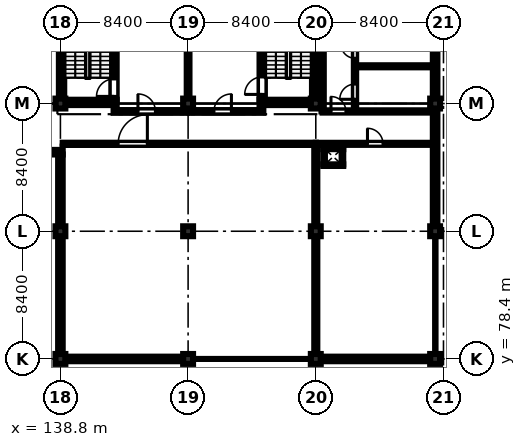
"""IFC4 building model, lengths in metres.
Left out: names, types, materials, properties, quantities, classifications, styles, units other than length and angle.
Written with IfcOpenShell. Run it as: python <this file> out.ifc"""

import sys

from ifc_helpers import new_model, si_unit, direction, frame, frame_2d, origin, origin_2d, place, context, subcontext, project, spatial, rectangle, extrude, element, fill, save


model = new_model("IFC4")
c1 = context("Model", 3, precision=1e-05, world=origin(), true_north=direction((0.0, 1.0)))
c2 = subcontext(c1, "Body", "Model", "MODEL_VIEW")
j1 = project(units=[si_unit("LENGTHUNIT", "METRE"), si_unit("PLANEANGLEUNIT", "RADIAN")], contexts=[c1])
p1 = place(None, origin())
s1 = spatial("IfcSite", under=j1, at=p1, CompositionType="ELEMENT")
p2 = place(p1, origin())
s2 = spatial("IfcBuilding", under=s1, at=p2, CompositionType="ELEMENT")
p3 = place(p2, frame((0.0, 0.0, 61.2)))
s3 = spatial("IfcBuildingStorey", under=s2, at=p3, CompositionType="ELEMENT", Elevation=61.2)
for number, where, z_axis, x_axis in (
    (1, (138.8, 78.4, 0.0), (0.0, 0.0, 1.0), (1.0, 0.0, 0.0)),
    (2, (138.8, 86.8, 0.0), (0.0, 0.0, 1.0), (1.0, 0.0, 0.0)),
    (3, (138.8, 95.2, 0.0), (0.0, 0.0, 1.0), (1.0, 0.0, 0.0)),
    (4, (147.2, 78.4, 0.0), (0.0, 0.0, 1.0), (1.0, 0.0, 0.0)),
    (5, (147.2, 86.8, 0.0), (0.0, 0.0, 1.0), (1.0, 0.0, 0.0)),
    (6, (147.2, 95.2, 0.0), (0.0, 0.0, 1.0), (1.0, 0.0, 0.0)),
    (7, (155.6, 78.4, 0.0), (0.0, 0.0, 1.0), (1.0, 0.0, 0.0)),
    (8, (155.6, 86.8, 0.0), (0.0, 0.0, 1.0), (1.0, 0.0, 0.0)),
    (9, (155.6, 95.2, 0.0), (0.0, 0.0, 1.0), (1.0, 0.0, 0.0)),
    (10, (163.45, 78.4, 0.0), (0.0, 0.0, 1.0), (1.0, 0.0, 0.0)),
    (11, (163.45, 86.8, 0.0), (0.0, 0.0, 1.0), (1.0, 0.0, 0.0)),
    (12, (163.45, 95.2, 0.0), (0.0, 0.0, 1.0), (1.0, 0.0, 0.0)),
):
    element("IfcColumn", number, at=place(p3, frame(where, z_axis=z_axis, x_axis=x_axis)), inside=s3, PredefinedType="COLUMN", context=c2, shape_type="SweptSolid", body=[
        extrude(rectangle(XDim=0.65, YDim=0.65, at=origin_2d()), origin(), (0.0, 0.0, 1.0), 4.28),
    ])
p4 = place(p3, frame((138.7, 95.275, 0.0), z_axis=(0.0, 0.0, 1.0), x_axis=(1.0, 0.0, 0.0)))
e13 = element("IfcWall", 13, at=p4, inside=s3, PredefinedType="SHEAR", context=c2, shape_type="SweptSolid", body=[
    extrude(rectangle(XDim=3.8, YDim=0.35, at=frame_2d((1.9, 0.0))), origin(), (0.0, 0.0, 1.0), 4.28),
])
p5 = place(p3, frame((138.875, 95.45, 0.0), z_axis=(0.0, 0.0, 1.0), x_axis=(0.0, 1.0, 0.0)))
e14 = element("IfcWall", 14, at=p5, inside=s3, PredefinedType="SHEAR", context=c2, shape_type="SweptSolid", body=[
    extrude(rectangle(XDim=7.9, YDim=0.35, at=frame_2d((3.95, 0.0))), origin(), (0.0, 0.0, 1.0), 4.28),
])
p6 = place(p3, frame((142.325, 95.45, 0.0), z_axis=(0.0, 0.0, 1.0), x_axis=(0.0, 1.0, 0.0)))
e15 = element("IfcWall", 15, at=p6, inside=s3, PredefinedType="SHEAR", context=c2, shape_type="SweptSolid", body=[
    extrude(rectangle(XDim=7.9, YDim=0.35, at=frame_2d((3.95, 0.0))), origin(), (0.0, 0.0, 1.0), 4.28),
])
p7 = place(p6, frame((0.22, 0.0, 0.0)))
e16 = element("IfcOpeningElement", 16, at=p7, cuts=e15, PredefinedType="OPENING", context=c2, shape_type="SweptSolid", body=[
    extrude(rectangle(XDim=1.15, YDim=2.15, at=frame_2d((0.575, 1.075))), frame((0.0, 0.185, 0.0), z_axis=(0.0, -1.0, 0.0), x_axis=(1.0, 0.0, 0.0)), (0.0, 0.0, 1.0), 0.37),
])
p8 = place(p3, frame((151.9, 95.275, 0.0), z_axis=(0.0, 0.0, 1.0), x_axis=(1.0, 0.0, 0.0)))
e17 = element("IfcWall", 17, at=p8, inside=s3, PredefinedType="SHEAR", context=c2, shape_type="SweptSolid", body=[
    extrude(rectangle(XDim=3.8, YDim=0.35, at=frame_2d((1.9, 0.0))), origin(), (0.0, 0.0, 1.0), 4.28),
])
p9 = place(p3, frame((152.075, 95.45, 0.0), z_axis=(0.0, 0.0, 1.0), x_axis=(0.0, 1.0, 0.0)))
e18 = element("IfcWall", 18, at=p9, inside=s3, PredefinedType="SHEAR", context=c2, shape_type="SweptSolid", body=[
    extrude(rectangle(XDim=7.9, YDim=0.35, at=frame_2d((3.95, 0.0))), origin(), (0.0, 0.0, 1.0), 4.28),
])
p10 = place(p9, frame((0.35, 0.0, 0.0)))
e19 = element("IfcOpeningElement", 19, at=p10, cuts=e18, PredefinedType="OPENING", context=c2, shape_type="SweptSolid", body=[
    extrude(rectangle(XDim=1.15, YDim=2.15, at=frame_2d((0.575, 1.075))), frame((0.0, 0.185, 0.0), z_axis=(0.0, -1.0, 0.0), x_axis=(1.0, 0.0, 0.0)), (0.0, 0.0, 1.0), 0.37),
])
p11 = place(p3, frame((155.525, 95.45, 0.0), z_axis=(0.0, 0.0, 1.0), x_axis=(0.0, 1.0, 0.0)))
e20 = element("IfcWall", 20, at=p11, inside=s3, PredefinedType="SHEAR", context=c2, shape_type="SweptSolid", body=[
    extrude(rectangle(XDim=7.9, YDim=0.35, at=frame_2d((3.95, 0.0))), origin(), (0.0, 0.0, 1.0), 4.28),
])
p12 = place(p3, frame((146.875, 78.4, 0.0), z_axis=(0.0, 0.0, 1.0), x_axis=(-1.0, 0.0, 0.0)))
e21 = element("IfcWall", 21, at=p12, inside=s3, PredefinedType="STANDARD", context=c2, shape_type="SweptSolid", body=[
    extrude(rectangle(XDim=7.75, YDim=0.3, at=frame_2d((3.875, 0.0))), origin(), (0.0, 0.0, 1.0), 3.58),
])
p13 = place(p12, frame((1.15, 0.0, 0.95)))
e22 = element("IfcOpeningElement", 22, at=p13, cuts=e21, PredefinedType="OPENING", context=c2, shape_type="SweptSolid", body=[
    extrude(rectangle(XDim=2.4, YDim=2.1, at=frame_2d((1.2, 1.05))), frame((0.0, 0.16, 0.0), z_axis=(0.0, -1.0, 0.0), x_axis=(1.0, 0.0, 0.0)), (0.0, 0.0, 1.0), 0.32),
])
p14 = place(p3, frame((163.125, 78.4, 0.0), z_axis=(0.0, 0.0, 1.0), x_axis=(-1.0, 0.0, 0.0)))
e23 = element("IfcWall", 23, at=p14, inside=s3, PredefinedType="STANDARD", context=c2, shape_type="SweptSolid", body=[
    extrude(rectangle(XDim=7.2, YDim=0.3, at=frame_2d((3.6, 0.0))), origin(), (0.0, 0.0, 1.0), 3.58),
])
p15 = place(p14, frame((1.15, 0.0, 0.95)))
e24 = element("IfcOpeningElement", 24, at=p15, cuts=e23, PredefinedType="OPENING", context=c2, shape_type="SweptSolid", body=[
    extrude(rectangle(XDim=2.4, YDim=2.1, at=frame_2d((1.2, 1.05))), frame((0.0, 0.16, 0.0), z_axis=(0.0, -1.0, 0.0), x_axis=(1.0, 0.0, 0.0)), (0.0, 0.0, 1.0), 0.32),
])
p16 = place(p3, frame((163.45, 94.875, 0.0), z_axis=(0.0, 0.0, 1.0), x_axis=(0.0, -1.0, 0.0)))
e25 = element("IfcWall", 25, at=p16, inside=s3, PredefinedType="STANDARD", context=c2, shape_type="SweptSolid", body=[
    extrude(rectangle(XDim=7.75, YDim=0.3, at=frame_2d((3.875, 0.0))), origin(), (0.0, 0.0, 1.0), 3.58),
])
p17 = place(p16, frame((4.2, 0.0, 1.1)))
e26 = element("IfcOpeningElement", 26, at=p17, cuts=e25, PredefinedType="OPENING", context=c2, shape_type="SweptSolid", body=[
    extrude(rectangle(XDim=1.8, YDim=1.8, at=frame_2d((0.9, 0.9))), frame((0.0, 0.16, 0.0), z_axis=(0.0, -1.0, 0.0), x_axis=(1.0, 0.0, 0.0)), (0.0, 0.0, 1.0), 0.32),
])
p18 = place(p3, frame((163.45, 103.275, 0.0), z_axis=(0.0, 0.0, 1.0), x_axis=(0.0, -1.0, 0.0)))
e27 = element("IfcWall", 27, at=p18, inside=s3, PredefinedType="STANDARD", context=c2, shape_type="SweptSolid", body=[
    extrude(rectangle(XDim=7.75, YDim=0.3, at=frame_2d((3.875, 0.0))), origin(), (0.0, 0.0, 1.0), 3.58),
])
p19 = place(p18, frame((1.15, 0.0, 1.1)))
e28 = element("IfcOpeningElement", 28, at=p19, cuts=e27, PredefinedType="OPENING", context=c2, shape_type="SweptSolid", body=[
    extrude(rectangle(XDim=1.4, YDim=1.4, at=frame_2d((0.7, 0.7))), frame((0.0, 0.16, 0.0), z_axis=(0.0, -1.0, 0.0), x_axis=(1.0, 0.0, 0.0)), (0.0, 0.0, 1.0), 0.32),
])
p20 = place(p3, frame((138.8, 78.725, 0.0), z_axis=(0.0, 0.0, 1.0), x_axis=(0.0, 1.0, 0.0)))
e29 = element("IfcWall", 29, at=p20, inside=s3, PredefinedType="STANDARD", context=c2, shape_type="SweptSolid", body=[
    extrude(rectangle(XDim=7.75, YDim=0.3, at=frame_2d((3.875, 0.0))), origin(), (0.0, 0.0, 1.0), 3.58),
])
p21 = place(p20, frame((2.4, 0.0, 0.95)))
e30 = element("IfcOpeningElement", 30, at=p21, cuts=e29, PredefinedType="OPENING", context=c2, shape_type="SweptSolid", body=[
    extrude(rectangle(XDim=1.5, YDim=1.8, at=frame_2d((0.75, 0.9))), frame((0.0, 0.16, 0.0), z_axis=(0.0, -1.0, 0.0), x_axis=(1.0, 0.0, 0.0)), (0.0, 0.0, 1.0), 0.32),
])
p22 = place(p3, frame((138.8, 87.125, 0.0), z_axis=(0.0, 0.0, 1.0), x_axis=(0.0, 1.0, 0.0)))
e31 = element("IfcWall", 31, at=p22, inside=s3, PredefinedType="STANDARD", context=c2, shape_type="SweptSolid", body=[
    extrude(rectangle(XDim=4.725, YDim=0.3, at=frame_2d((2.363, 0.0))), origin(), (0.0, 0.0, 1.0), 3.58),
])
p23 = place(p22, frame((2.4, 0.0, 0.95)))
e32 = element("IfcOpeningElement", 32, at=p23, cuts=e31, PredefinedType="OPENING", context=c2, shape_type="SweptSolid", body=[
    extrude(rectangle(XDim=1.5, YDim=1.8, at=frame_2d((0.75, 0.9))), frame((0.0, 0.16, 0.0), z_axis=(0.0, -1.0, 0.0), x_axis=(1.0, 0.0, 0.0)), (0.0, 0.0, 1.0), 0.32),
])
p24 = place(p3, frame((138.95, 92.0, 0.0), z_axis=(0.0, 0.0, 1.0), x_axis=(-1.0, 0.0, 0.0)))
e33 = element("IfcWall", 33, at=p24, inside=s3, PredefinedType="STANDARD", context=c2, shape_type="SweptSolid", body=[
    extrude(rectangle(XDim=8.7, YDim=0.3, at=frame_2d((4.35, 0.0))), origin(), (0.0, 0.0, 1.0), 4.28),
])
p25 = place(p3, frame((142.3, 94.68, 0.0), z_axis=(0.0, 0.0, 1.0), x_axis=(1.0, 0.0, 0.0)))
e34 = element("IfcWall", 34, at=p25, inside=s3, PredefinedType="STANDARD", context=c2, shape_type="SweptSolid", body=[
    extrude(rectangle(XDim=4.8, YDim=0.18, at=frame_2d((2.4, 0.0))), origin(), (0.0, 0.0, 1.0), 4.28),
])
p26 = place(p25, frame((1.6, 0.0, 0.0)))
e35 = element("IfcOpeningElement", 35, at=p26, cuts=e34, PredefinedType="OPENING", context=c2, shape_type="SweptSolid", body=[
    extrude(rectangle(XDim=1.15, YDim=2.15, at=frame_2d((0.575, 1.075))), frame((0.0, 0.1, 0.0), z_axis=(0.0, -1.0, 0.0), x_axis=(1.0, 0.0, 0.0)), (0.0, 0.0, 1.0), 0.2),
])
p27 = place(p3, frame((147.3, 94.68, 0.0), z_axis=(0.0, 0.0, 1.0), x_axis=(1.0, 0.0, 0.0)))
e36 = element("IfcWall", 36, at=p27, inside=s3, PredefinedType="STANDARD", context=c2, shape_type="SweptSolid", body=[
    extrude(rectangle(XDim=4.85, YDim=0.18, at=frame_2d((2.425, 0.0))), origin(), (0.0, 0.0, 1.0), 4.28),
])
p28 = place(p27, frame((1.6, 0.0, 0.0)))
e37 = element("IfcOpeningElement", 37, at=p28, cuts=e36, PredefinedType="OPENING", context=c2, shape_type="SweptSolid", body=[
    extrude(rectangle(XDim=1.15, YDim=2.15, at=frame_2d((0.575, 1.075))), frame((0.0, 0.1, 0.0), z_axis=(0.0, -1.0, 0.0), x_axis=(1.0, 0.0, 0.0)), (0.0, 0.0, 1.0), 0.2),
])
p29 = place(p3, frame((147.2, 95.75, 0.0), z_axis=(0.0, 0.0, 1.0), x_axis=(0.0, 1.0, 0.0)))
e38 = element("IfcWall", 38, at=p29, inside=s3, PredefinedType="STANDARD", context=c2, shape_type="SweptSolid", body=[
    extrude(rectangle(XDim=4.5, YDim=0.18, at=frame_2d((2.25, 0.0))), origin(), (0.0, 0.0, 1.0), 3.58),
])
p30 = place(p3, frame((156.05, 94.68, 0.0), z_axis=(0.0, 0.0, 1.0), x_axis=(1.0, 0.0, 0.0)))
e39 = element("IfcWall", 39, at=p30, inside=s3, PredefinedType="PARTITIONING", context=c2, shape_type="SweptSolid", body=[
    extrude(rectangle(XDim=7.15, YDim=0.15, at=frame_2d((3.575, 0.0))), origin(), (0.0, 0.0, 1.0), 4.28),
])
p31 = place(p30, frame((0.55, 0.0, 0.0)))
e40 = element("IfcOpeningElement", 40, at=p31, cuts=e39, PredefinedType="OPENING", context=c2, shape_type="SweptSolid", body=[
    extrude(rectangle(XDim=0.98, YDim=2.12, at=frame_2d((0.49, 1.06))), frame((0.0, 0.085, 0.0), z_axis=(0.0, -1.0, 0.0), x_axis=(1.0, 0.0, 0.0)), (0.0, 0.0, 1.0), 0.17),
])
p32 = place(p3, frame((158.18, 94.68, 0.0), z_axis=(0.0, 0.0, 1.0), x_axis=(0.0, 1.0, 0.0)))
e41 = element("IfcWall", 41, at=p32, inside=s3, PredefinedType="PARTITIONING", context=c2, shape_type="SweptSolid", body=[
    extrude(rectangle(XDim=8.57, YDim=0.15, at=frame_2d((4.285, 0.0))), origin(), (0.0, 0.0, 1.0), 4.28),
])
p33 = place(p32, frame((0.8, 0.0, 0.0)))
e42 = element("IfcOpeningElement", 42, at=p33, cuts=e41, PredefinedType="OPENING", context=c2, shape_type="SweptSolid", body=[
    extrude(rectangle(XDim=1.0, YDim=2.12, at=frame_2d((0.5, 1.06))), frame((0.0, 0.085, 0.0), z_axis=(0.0, -1.0, 0.0), x_axis=(1.0, 0.0, 0.0)), (0.0, 0.0, 1.0), 0.17),
])
p34 = place(p32, frame((3.5, 0.0, 0.0)))
e43 = element("IfcOpeningElement", 43, at=p34, cuts=e41, PredefinedType="OPENING", context=c2, shape_type="SweptSolid", body=[
    extrude(rectangle(XDim=0.92, YDim=2.1, at=frame_2d((0.46, 1.05))), frame((0.0, 0.085, 0.0), z_axis=(0.0, -1.0, 0.0), x_axis=(1.0, 0.0, 0.0)), (0.0, 0.0, 1.0), 0.17),
])
p35 = place(p32, frame((6.4, 0.0, 0.0)))
e44 = element("IfcOpeningElement", 44, at=p35, cuts=e41, PredefinedType="OPENING", context=c2, shape_type="SweptSolid", body=[
    extrude(rectangle(XDim=0.92, YDim=2.1, at=frame_2d((0.46, 1.05))), frame((0.0, 0.085, 0.0), z_axis=(0.0, -1.0, 0.0), x_axis=(1.0, 0.0, 0.0)), (0.0, 0.0, 1.0), 0.17),
])
p36 = place(p3, frame((158.18, 97.65, 0.0), z_axis=(0.0, 0.0, 1.0), x_axis=(1.0, 0.0, 0.0)))
e45 = element("IfcWall", 45, at=p36, inside=s3, PredefinedType="PARTITIONING", context=c2, shape_type="SweptSolid", body=[
    extrude(rectangle(XDim=5.02, YDim=0.135, at=frame_2d((2.51, 0.0))), origin(), (0.0, 0.0, 1.0), 4.28),
])
p37 = place(p3, frame((156.05, 94.68, 0.0), z_axis=(0.0, 0.0, 1.0), x_axis=(0.0, 1.0, 0.0)))
e46 = element("IfcWall", 46, at=p37, inside=s3, PredefinedType="PARTITIONING", context=c2, shape_type="SweptSolid", body=[
    extrude(rectangle(XDim=8.57, YDim=0.15, at=frame_2d((4.285, 0.0))), origin(), (0.0, 0.0, 1.0), 4.28),
])
p38 = place(p3, frame((138.95, 92.55, 0.0), z_axis=(0.0, 0.0, 1.0), x_axis=(1.0, 0.0, 0.0)))
e47 = element("IfcWall", 47, at=p38, inside=s3, PredefinedType="PARTITIONING", context=c2, shape_type="SweptSolid", body=[
    extrude(rectangle(XDim=16.65, YDim=0.145, at=frame_2d((8.325, 0.0))), origin(), (0.0, 0.0, 1.0), 4.28),
])
p39 = place(p38, frame((3.65, 0.0, 0.0)))
e48 = element("IfcOpeningElement", 48, at=p39, cuts=e47, PredefinedType="OPENING", context=c2, shape_type="SweptSolid", body=[
    extrude(rectangle(XDim=1.92, YDim=2.28, at=frame_2d((0.96, 1.14))), frame((0.0, 0.083, 0.0), z_axis=(0.0, -1.0, 0.0), x_axis=(1.0, 0.0, 0.0)), (0.0, 0.0, 1.0), 0.165),
])
p40 = place(p3, frame((155.6, 92.55, 0.0), z_axis=(0.0, 0.0, 1.0), x_axis=(1.0, 0.0, 0.0)))
e49 = element("IfcWall", 49, at=p40, inside=s3, PredefinedType="PARTITIONING", context=c2, shape_type="SweptSolid", body=[
    extrude(rectangle(XDim=7.75, YDim=0.135, at=frame_2d((3.875, 0.0))), origin(), (0.0, 0.0, 1.0), 4.28),
])
p41 = place(p40, frame((3.4, 0.0, 0.0)))
e50 = element("IfcOpeningElement", 50, at=p41, cuts=e49, PredefinedType="OPENING", context=c2, shape_type="SweptSolid", body=[
    extrude(rectangle(XDim=1.02, YDim=2.15, at=frame_2d((0.51, 1.075))), frame((0.0, 0.077, 0.0), z_axis=(0.0, -1.0, 0.0), x_axis=(1.0, 0.0, 0.0)), (0.0, 0.0, 1.0), 0.155),
])
p42 = place(p3, frame((155.6, 78.55, 0.0), z_axis=(0.0, 0.0, 1.0), x_axis=(0.0, 1.0, 0.0)))
e51 = element("IfcWall", 51, at=p42, inside=s3, PredefinedType="SOLIDWALL", context=c2, shape_type="SweptSolid", body=[
    extrude(rectangle(XDim=14.0, YDim=0.2, at=frame_2d((7.0, 0.0))), origin(), (0.0, 0.0, 1.0), 3.58),
])
for number, where, z_axis, x_axis in (
    (52, (156.095, 91.147, 0.0), (0.0, 0.0, 1.0), (1.0, 0.0, 0.0)),
    (53, (156.095, 92.252, 0.0), (0.0, 0.0, 1.0), (1.0, 0.0, 0.0)),
):
    element("IfcWall", number, at=place(p3, frame(where, z_axis=z_axis, x_axis=x_axis)), inside=s3, PredefinedType="PARTITIONING", context=c2, shape_type="SweptSolid", body=[
        extrude(rectangle(XDim=1.31, YDim=0.105, at=frame_2d((0.655, 0.0))), origin(), (0.0, 0.0, 1.0), 4.28),
    ])
for number, where, z_axis, x_axis in (
    (54, (156.147, 91.2, 0.0), (0.0, 0.0, 1.0), (0.0, 1.0, 0.0)),
    (55, (157.353, 91.2, 0.0), (0.0, 0.0, 1.0), (0.0, 1.0, 0.0)),
):
    element("IfcWall", number, at=place(p3, frame(where, z_axis=z_axis, x_axis=x_axis)), inside=s3, PredefinedType="PARTITIONING", context=c2, shape_type="SweptSolid", body=[
        extrude(rectangle(XDim=1.0, YDim=0.105, at=frame_2d((0.5, 0.0))), origin(), (0.0, 0.0, 1.0), 4.28),
    ])
p43 = place(p13, origin())
e56 = element("IfcWindow", 56, at=p43, inside=s3, PartitioningType="TRIPLE_PANEL_VERTICAL", PredefinedType="WINDOW", context=c2, shape_type="SweptSolid", body=[
    extrude(rectangle(XDim=2.4, YDim=2.1, at=frame_2d((1.2, 1.05))), frame((0.0, 0.03, 0.0), z_axis=(0.0, -1.0, 0.0), x_axis=(1.0, 0.0, 0.0)), (0.0, 0.0, 1.0), 0.06),
])
fill(e22, e56)
p44 = place(p15, origin())
e57 = element("IfcWindow", 57, at=p44, inside=s3, PartitioningType="TRIPLE_PANEL_VERTICAL", PredefinedType="WINDOW", context=c2, shape_type="SweptSolid", body=[
    extrude(rectangle(XDim=2.4, YDim=2.1, at=frame_2d((1.2, 1.05))), frame((0.0, 0.03, 0.0), z_axis=(0.0, -1.0, 0.0), x_axis=(1.0, 0.0, 0.0)), (0.0, 0.0, 1.0), 0.06),
])
fill(e24, e57)
p45 = place(p17, origin())
e58 = element("IfcWindow", 58, at=p45, inside=s3, PartitioningType="DOUBLE_PANEL_VERTICAL", PredefinedType="WINDOW", context=c2, shape_type="SweptSolid", body=[
    extrude(rectangle(XDim=1.8, YDim=1.8, at=frame_2d((0.9, 0.9))), frame((0.0, 0.03, 0.0), z_axis=(0.0, -1.0, 0.0), x_axis=(1.0, 0.0, 0.0)), (0.0, 0.0, 1.0), 0.06),
])
fill(e26, e58)
p46 = place(p21, origin())
e59 = element("IfcWindow", 59, at=p46, inside=s3, PartitioningType="DOUBLE_PANEL_VERTICAL", PredefinedType="WINDOW", context=c2, shape_type="SweptSolid", body=[
    extrude(rectangle(XDim=1.5, YDim=1.8, at=frame_2d((0.75, 0.9))), frame((0.0, 0.03, 0.0), z_axis=(0.0, -1.0, 0.0), x_axis=(1.0, 0.0, 0.0)), (0.0, 0.0, 1.0), 0.06),
])
fill(e30, e59)
p47 = place(p23, origin())
e60 = element("IfcWindow", 60, at=p47, inside=s3, PartitioningType="DOUBLE_PANEL_VERTICAL", PredefinedType="WINDOW", context=c2, shape_type="SweptSolid", body=[
    extrude(rectangle(XDim=1.5, YDim=1.8, at=frame_2d((0.75, 0.9))), frame((0.0, 0.03, 0.0), z_axis=(0.0, -1.0, 0.0), x_axis=(1.0, 0.0, 0.0)), (0.0, 0.0, 1.0), 0.06),
])
fill(e32, e60)
p48 = place(p26, origin())
e61 = element("IfcDoor", 61, at=p48, inside=s3, OperationType="SINGLE_SWING_LEFT", PredefinedType="DOOR", context=c2, shape_type="SweptSolid", body=[
    extrude(rectangle(XDim=1.15, YDim=2.15, at=frame_2d((0.575, 1.075))), frame((0.0, 0.025, 0.0), z_axis=(0.0, -1.0, 0.0), x_axis=(1.0, 0.0, 0.0)), (0.0, 0.0, 1.0), 0.05),
])
fill(e35, e61)
p49 = place(p28, origin())
e62 = element("IfcDoor", 62, at=p49, inside=s3, OperationType="SINGLE_SWING_RIGHT", PredefinedType="DOOR", context=c2, shape_type="SweptSolid", body=[
    extrude(rectangle(XDim=1.15, YDim=2.15, at=frame_2d((0.575, 1.075))), frame((0.0, 0.025, 0.0), z_axis=(0.0, -1.0, 0.0), x_axis=(1.0, 0.0, 0.0)), (0.0, 0.0, 1.0), 0.05),
])
fill(e37, e62)
p50 = place(p31, origin())
e63 = element("IfcDoor", 63, at=p50, inside=s3, OperationType="SINGLE_SWING_LEFT", PredefinedType="DOOR", context=c2, shape_type="SweptSolid", body=[
    extrude(rectangle(XDim=0.98, YDim=2.12, at=frame_2d((0.49, 1.06))), frame((0.0, 0.025, 0.0), z_axis=(0.0, -1.0, 0.0), x_axis=(1.0, 0.0, 0.0)), (0.0, 0.0, 1.0), 0.05),
])
fill(e40, e63)
p51 = place(p33, origin())
e64 = element("IfcDoor", 64, at=p51, inside=s3, OperationType="SINGLE_SWING_LEFT", PredefinedType="DOOR", context=c2, shape_type="SweptSolid", body=[
    extrude(rectangle(XDim=1.0, YDim=2.12, at=frame_2d((0.5, 1.06))), frame((0.0, 0.025, 0.0), z_axis=(0.0, -1.0, 0.0), x_axis=(1.0, 0.0, 0.0)), (0.0, 0.0, 1.0), 0.05),
])
fill(e42, e64)
p52 = place(p34, origin())
e65 = element("IfcDoor", 65, at=p52, inside=s3, OperationType="SINGLE_SWING_RIGHT", PredefinedType="DOOR", context=c2, shape_type="SweptSolid", body=[
    extrude(rectangle(XDim=0.92, YDim=2.1, at=frame_2d((0.46, 1.05))), frame((0.0, 0.025, 0.0), z_axis=(0.0, -1.0, 0.0), x_axis=(1.0, 0.0, 0.0)), (0.0, 0.0, 1.0), 0.05),
])
fill(e43, e65)
p53 = place(p39, origin())
e66 = element("IfcDoor", 66, at=p53, inside=s3, OperationType="SINGLE_SWING_RIGHT", PredefinedType="DOOR", context=c2, shape_type="SweptSolid", body=[
    extrude(rectangle(XDim=1.92, YDim=2.28, at=frame_2d((0.96, 1.14))), frame((0.0, 0.025, 0.0), z_axis=(0.0, -1.0, 0.0), x_axis=(1.0, 0.0, 0.0)), (0.0, 0.0, 1.0), 0.05),
])
fill(e48, e66)
p54 = place(p41, origin())
e67 = element("IfcDoor", 67, at=p54, inside=s3, OperationType="SINGLE_SWING_LEFT", PredefinedType="DOOR", context=c2, shape_type="SweptSolid", body=[
    extrude(rectangle(XDim=1.02, YDim=2.15, at=frame_2d((0.51, 1.075))), frame((0.0, 0.025, 0.0), z_axis=(0.0, -1.0, 0.0), x_axis=(1.0, 0.0, 0.0)), (0.0, 0.0, 1.0), 0.05),
])
fill(e50, e67)
p55 = place(p7, origin())
e68 = element("IfcDoor", 68, at=p55, inside=s3, OperationType="SINGLE_SWING_LEFT", PredefinedType="DOOR", context=c2, shape_type="SweptSolid", body=[
    extrude(rectangle(XDim=1.15, YDim=2.15, at=frame_2d((0.575, 1.075))), frame((0.0, 0.025, 0.0), z_axis=(0.0, -1.0, 0.0), x_axis=(1.0, 0.0, 0.0)), (0.0, 0.0, 1.0), 0.05),
])
fill(e16, e68)
p56 = place(p10, origin())
e69 = element("IfcDoor", 69, at=p56, inside=s3, OperationType="SINGLE_SWING_LEFT", PredefinedType="DOOR", context=c2, shape_type="SweptSolid", body=[
    extrude(rectangle(XDim=1.15, YDim=2.15, at=frame_2d((0.575, 1.075))), frame((0.0, 0.025, 0.0), z_axis=(0.0, -1.0, 0.0), x_axis=(1.0, 0.0, 0.0)), (0.0, 0.0, 1.0), 0.05),
])
fill(e19, e69)
save(model, sys.argv[1])
